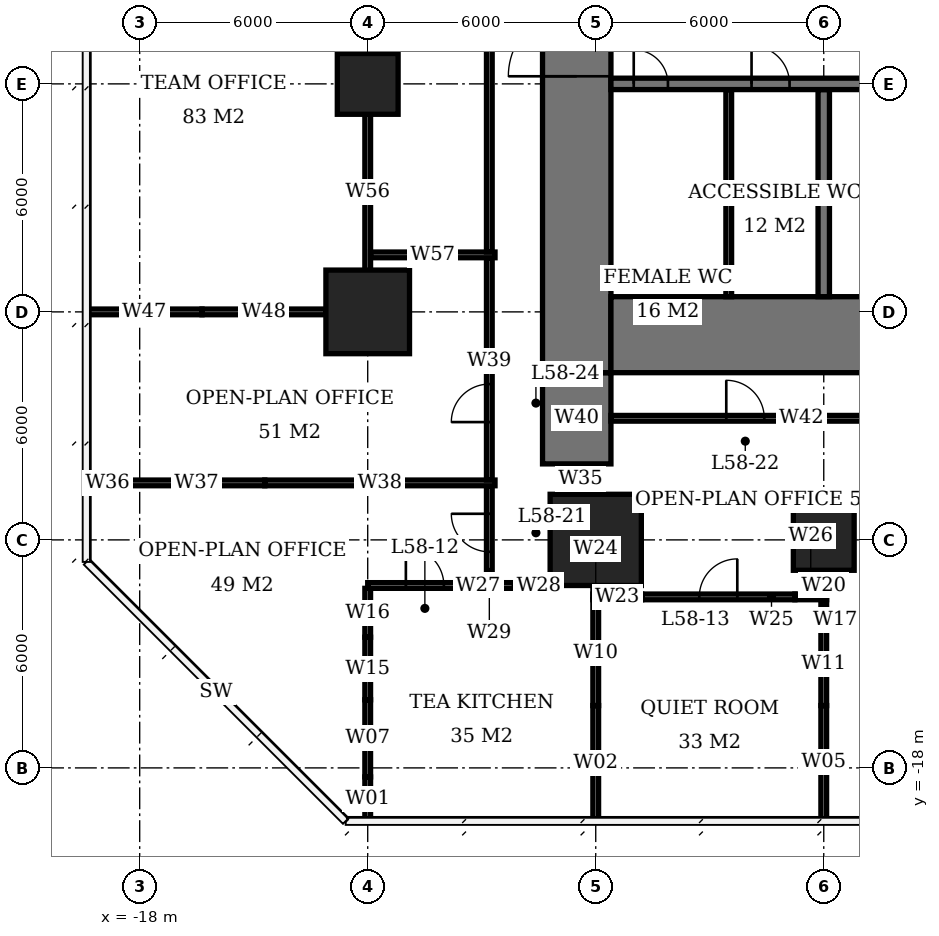
"""IFC4 building model, lengths in metres.
Left out: names, types, materials, properties, quantities, classifications, styles, units other than length and angle.
Written with IfcOpenShell. Run it as: python <this file> out.ifc"""

import sys

from ifc_helpers import new_model, si_unit, direction, frame, frame_2d, origin, origin_2d, place, context, subcontext, project, spatial, rectangle, extrude, element, fill, save


model = new_model("IFC4")
c1 = context("Model", 3, precision=1e-05, world=origin(), true_north=direction((0.0, 1.0)))
c2 = subcontext(c1, "Body", "Model", "MODEL_VIEW")
j1 = project(units=[si_unit("LENGTHUNIT", "METRE"), si_unit("PLANEANGLEUNIT", "RADIAN")], contexts=[c1])
p1 = place(None, origin())
s1 = spatial("IfcSite", under=j1, at=p1, CompositionType="ELEMENT")
p2 = place(p1, origin())
s2 = spatial("IfcBuilding", under=s1, at=p2, CompositionType="ELEMENT")
p3 = place(p2, frame((0.0, 0.0, 235.7)))
s3 = spatial("IfcBuildingStorey", under=s2, at=p3, CompositionType="ELEMENT", Elevation=235.7)
p4 = place(p3, frame((-12.0, -6.0, 0.0), z_axis=(0.0, 0.0, 1.0), x_axis=(1.0, 0.0, 0.0)))
e1 = element("IfcColumn", 1, at=p4, inside=s3, PredefinedType="COLUMN", context=c2, shape_type="SweptSolid", body=[
    extrude(rectangle(XDim=2.2, YDim=2.2, at=origin_2d()), origin(), (0.0, 0.0, 1.0), 3.9),
])
p5 = place(p3, frame((-12.0, 0.0, 0.0), z_axis=(0.0, 0.0, 1.0), x_axis=(1.0, 0.0, 0.0)))
e2 = element("IfcColumn", 2, at=p5, inside=s3, PredefinedType="COLUMN", context=c2, shape_type="SweptSolid", body=[
    extrude(rectangle(XDim=1.6, YDim=1.6, at=origin_2d()), origin(), (0.0, 0.0, 1.0), 3.9),
])
p6 = place(p3, frame((-6.0, -12.0, 0.0), z_axis=(0.0, 0.0, 1.0), x_axis=(1.0, 0.0, 0.0)))
e3 = element("IfcColumn", 3, at=p6, inside=s3, PredefinedType="COLUMN", context=c2, shape_type="SweptSolid", body=[
    extrude(rectangle(XDim=2.4, YDim=2.4, at=origin_2d()), origin(), (0.0, 0.0, 1.0), 3.9),
])
p7 = place(p3, frame((0.0, -12.0, 0.0), z_axis=(0.0, 0.0, 1.0), x_axis=(1.0, 0.0, 0.0)))
e4 = element("IfcColumn", 4, at=p7, inside=s3, PredefinedType="COLUMN", context=c2, shape_type="SweptSolid", body=[
    extrude(rectangle(XDim=1.6, YDim=1.6, at=origin_2d()), origin(), (0.0, 0.0, 1.0), 3.9),
])
p8 = place(p3, frame((-5.6, -6.6, 0.0), z_axis=(0.0, 0.0, 1.0), x_axis=(1.0, 0.0, 0.0)))
e5 = element("IfcWall", 5, at=p8, inside=s3, PredefinedType="SHEAR", context=c2, shape_type="SweptSolid", body=[
    extrude(rectangle(XDim=23.2, YDim=2.0, at=frame_2d((11.6, 0.0))), origin(), (0.0, 0.0, 1.0), 3.9),
])
p9 = place(p3, frame((-6.5, -7.6, 0.0), z_axis=(0.0, 0.0, 1.0), x_axis=(0.0, 1.0, 0.0)))
e6 = element("IfcWall", 6, at=p9, inside=s3, PredefinedType="SHEAR", context=c2, shape_type="SweptSolid", body=[
    extrude(rectangle(XDim=21.2, YDim=1.8, at=frame_2d((10.6, 0.0))), origin(), (0.0, 0.0, 1.0), 3.9),
])
p10 = place(p9, frame((7.8, 0.0, 0.0)))
e7 = element("IfcOpeningElement", 7, at=p10, cuts=e6, PredefinedType="OPENING", context=c2, shape_type="SweptSolid", body=[
    extrude(rectangle(XDim=1.8, YDim=2.4, at=frame_2d((0.9, 1.2))), frame((0.0, 0.91, 0.0), z_axis=(0.0, -1.0, 0.0), x_axis=(1.0, 0.0, 0.0)), (0.0, 0.0, 1.0), 1.82),
])
p11 = place(p3, frame((-6.5, -10.0, 0.0), z_axis=(0.0, 0.0, 1.0), x_axis=(0.0, 1.0, 0.0)))
e8 = element("IfcWall", 8, at=p11, inside=s3, PredefinedType="SHEAR", context=c2, shape_type="SweptSolid", body=[
    extrude(rectangle(XDim=2.4, YDim=1.8, at=frame_2d((1.2, 0.0))), origin(), (0.0, 0.0, 1.0), 3.9),
])
p12 = place(p3, frame((-5.6, 0.0, 0.0), z_axis=(0.0, 0.0, 1.0), x_axis=(1.0, 0.0, 0.0)))
e9 = element("IfcWall", 9, at=p12, inside=s3, PredefinedType="SHEAR", context=c2, shape_type="SweptSolid", body=[
    extrude(rectangle(XDim=17.75, YDim=0.3, at=frame_2d((8.875, 0.0))), origin(), (0.0, 0.0, 1.0), 3.9),
])
p13 = place(p12, frame((0.6, 0.0, 0.0)))
e10 = element("IfcOpeningElement", 10, at=p13, cuts=e9, PredefinedType="OPENING", context=c2, shape_type="SweptSolid", body=[
    extrude(rectangle(XDim=0.9, YDim=2.1, at=frame_2d((0.45, 1.05))), frame((0.0, 0.16, 0.0), z_axis=(0.0, -1.0, 0.0), x_axis=(1.0, 0.0, 0.0)), (0.0, 0.0, 1.0), 0.32),
])
p14 = place(p12, frame((3.7, 0.0, 0.0)))
e11 = element("IfcOpeningElement", 11, at=p14, cuts=e9, PredefinedType="OPENING", context=c2, shape_type="SweptSolid", body=[
    extrude(rectangle(XDim=1.0, YDim=2.1, at=frame_2d((0.5, 1.05))), frame((0.0, 0.16, 0.0), z_axis=(0.0, -1.0, 0.0), x_axis=(1.0, 0.0, 0.0)), (0.0, 0.0, 1.0), 0.32),
])
p15 = place(p12, frame((9.6, 0.0, 0.0)))
e12 = element("IfcOpeningElement", 12, at=p15, cuts=e9, PredefinedType="OPENING", context=c2, shape_type="SweptSolid", body=[
    extrude(rectangle(XDim=1.0, YDim=2.1, at=frame_2d((0.5, 1.05))), frame((0.0, 0.16, 0.0), z_axis=(0.0, -1.0, 0.0), x_axis=(1.0, 0.0, 0.0)), (0.0, 0.0, 1.0), 0.32),
])
p16 = place(p12, frame((12.55, 0.0, 0.0)))
e13 = element("IfcOpeningElement", 13, at=p16, cuts=e9, PredefinedType="OPENING", context=c2, shape_type="SweptSolid", body=[
    extrude(rectangle(XDim=1.1, YDim=2.1, at=frame_2d((0.55, 1.05))), frame((0.0, 0.16, 0.0), z_axis=(0.0, -1.0, 0.0), x_axis=(1.0, 0.0, 0.0)), (0.0, 0.0, 1.0), 0.32),
])
p17 = place(p12, frame((15.55, 0.0, 0.0)))
e14 = element("IfcOpeningElement", 14, at=p17, cuts=e9, PredefinedType="OPENING", context=c2, shape_type="SweptSolid", body=[
    extrude(rectangle(XDim=1.1, YDim=2.1, at=frame_2d((0.55, 1.05))), frame((0.0, 0.16, 0.0), z_axis=(0.0, -1.0, 0.0), x_axis=(1.0, 0.0, 0.0)), (0.0, 0.0, 1.0), 0.32),
])
p18 = place(p3, frame((0.0, -5.6, 0.0), z_axis=(0.0, 0.0, 1.0), x_axis=(0.0, 1.0, 0.0)))
e15 = element("IfcWall", 15, at=p18, inside=s3, PredefinedType="SHEAR", context=c2, shape_type="SweptSolid", body=[
    extrude(rectangle(XDim=5.45, YDim=0.3, at=frame_2d((2.725, 0.0))), origin(), (0.0, 0.0, 1.0), 3.9),
])
p19 = place(p3, frame((-2.5, -5.6, 0.0), z_axis=(0.0, 0.0, 1.0), x_axis=(0.0, 1.0, 0.0)))
e16 = element("IfcWall", 16, at=p19, inside=s3, PredefinedType="PLUMBINGWALL", context=c2, shape_type="SweptSolid", body=[
    extrude(rectangle(XDim=5.45, YDim=0.15, at=frame_2d((2.725, 0.0))), origin(), (0.0, 0.0, 1.0), 3.65),
])
p20 = place(p3, frame((-0.15, -14.1, 0.0), z_axis=(0.0, 0.0, 1.0), x_axis=(1.0, 0.0, 0.0)))
e17 = element("IfcWall", 17, at=p20, inside=s3, PredefinedType="PARTITIONING", context=c2, shape_type="SweptSolid", body=[
    extrude(rectangle(XDim=0.91, YDim=0.15, at=frame_2d((0.455, 0.0))), origin(), (0.0, 0.0, 1.0), 2.15),
])
p21 = place(p3, frame((0.76, -14.1, 0.0), z_axis=(0.0, 0.0, 1.0), x_axis=(1.0, 0.0, 0.0)))
e18 = element("IfcWall", 18, at=p21, inside=s3, PredefinedType="PARTITIONING", context=c2, shape_type="SweptSolid", body=[
    extrude(rectangle(XDim=4.48, YDim=0.15, at=frame_2d((2.24, 0.0))), origin(), (0.0, 0.0, 1.0), 3.65),
])
p22 = place(p21, frame((1.74, 0.0, 0.0)))
e19 = element("IfcOpeningElement", 19, at=p22, cuts=e18, PredefinedType="OPENING", context=c2, shape_type="SweptSolid", body=[
    extrude(rectangle(XDim=1.0, YDim=2.1, at=frame_2d((0.5, 1.05))), frame((0.0, 0.085, 0.0), z_axis=(0.0, -1.0, 0.0), x_axis=(1.0, 0.0, 0.0)), (0.0, 0.0, 1.0), 0.17),
])
p23 = place(p3, frame((-6.075, -13.5, 0.0), z_axis=(0.0, 0.0, 1.0), x_axis=(1.0, 0.0, 0.0)))
e20 = element("IfcWall", 20, at=p23, inside=s3, PredefinedType="PARTITIONING", context=c2, shape_type="SweptSolid", body=[
    extrude(rectangle(XDim=1.285, YDim=0.15, at=frame_2d((0.643, 0.0))), origin(), (0.0, 0.0, 1.0), 2.15),
])
p24 = place(p3, frame((-4.79, -13.5, 0.0), z_axis=(0.0, 0.0, 1.0), x_axis=(1.0, 0.0, 0.0)))
e21 = element("IfcWall", 21, at=p24, inside=s3, PredefinedType="PARTITIONING", context=c2, shape_type="SweptSolid", body=[
    extrude(rectangle(XDim=4.03, YDim=0.15, at=frame_2d((2.015, 0.0))), origin(), (0.0, 0.0, 1.0), 3.65),
])
p25 = place(p24, frame((1.515, 0.0, 0.0)))
e22 = element("IfcOpeningElement", 22, at=p25, cuts=e21, PredefinedType="OPENING", context=c2, shape_type="SweptSolid", body=[
    extrude(rectangle(XDim=1.0, YDim=2.1, at=frame_2d((0.5, 1.05))), frame((0.0, 0.085, 0.0), z_axis=(0.0, -1.0, 0.0), x_axis=(1.0, 0.0, 0.0)), (0.0, 0.0, 1.0), 0.17),
])
p26 = place(p3, frame((-0.76, -13.5, 0.0), z_axis=(0.0, 0.0, 1.0), x_axis=(1.0, 0.0, 0.0)))
e23 = element("IfcWall", 23, at=p26, inside=s3, PredefinedType="PARTITIONING", context=c2, shape_type="SweptSolid", body=[
    extrude(rectangle(XDim=0.835, YDim=0.15, at=frame_2d((0.417, 0.0))), origin(), (0.0, 0.0, 1.0), 2.15),
])
p27 = place(p3, frame((-12.0, -13.2, 0.0), z_axis=(0.0, 0.0, 1.0), x_axis=(1.0, 0.0, 0.0)))
e24 = element("IfcWall", 24, at=p27, inside=s3, PredefinedType="PARTITIONING", context=c2, shape_type="SweptSolid", body=[
    extrude(rectangle(XDim=3.008, YDim=0.15, at=frame_2d((1.504, 0.0))), origin(), (0.0, 0.0, 1.0), 3.65),
])
p28 = place(p27, frame((1.004, 0.0, 0.0)))
e25 = element("IfcOpeningElement", 25, at=p28, cuts=e24, PredefinedType="OPENING", context=c2, shape_type="SweptSolid", body=[
    extrude(rectangle(XDim=1.0, YDim=2.1, at=frame_2d((0.5, 1.05))), frame((0.0, 0.085, 0.0), z_axis=(0.0, -1.0, 0.0), x_axis=(1.0, 0.0, 0.0)), (0.0, 0.0, 1.0), 0.17),
])
p29 = place(p3, frame((-8.992, -13.2, 0.0), z_axis=(0.0, 0.0, 1.0), x_axis=(1.0, 0.0, 0.0)))
e26 = element("IfcWall", 26, at=p29, inside=s3, PredefinedType="PARTITIONING", context=c2, shape_type="SweptSolid", body=[
    extrude(rectangle(XDim=1.792, YDim=0.15, at=frame_2d((0.896, 0.0))), origin(), (0.0, 0.0, 1.0), 2.15),
])
p30 = place(p3, frame((-19.4, -6.0, 0.0), z_axis=(0.0, 0.0, 1.0), x_axis=(1.0, 0.0, 0.0)))
e27 = element("IfcWall", 27, at=p30, inside=s3, PredefinedType="PARTITIONING", context=c2, shape_type="SweptSolid", body=[
    extrude(rectangle(XDim=3.04, YDim=0.15, at=frame_2d((1.52, 0.0))), origin(), (0.0, 0.0, 1.0), 3.65),
])
p31 = place(p3, frame((-16.36, -6.0, 0.0), z_axis=(0.0, 0.0, 1.0), x_axis=(1.0, 0.0, 0.0)))
e28 = element("IfcWall", 28, at=p31, inside=s3, PredefinedType="PARTITIONING", context=c2, shape_type="SweptSolid", body=[
    extrude(rectangle(XDim=3.26, YDim=0.15, at=frame_2d((1.63, 0.0))), origin(), (0.0, 0.0, 1.0), 2.15),
])
p32 = place(p3, frame((-12.0, -19.4, 0.0), z_axis=(0.0, 0.0, 1.0), x_axis=(0.0, 1.0, 0.0)))
e29 = element("IfcWall", 29, at=p32, inside=s3, PredefinedType="PARTITIONING", context=c2, shape_type="SweptSolid", body=[
    extrude(rectangle(XDim=1.163, YDim=0.15, at=frame_2d((0.582, 0.0))), origin(), (0.0, 0.0, 1.0), 3.65),
])
p33 = place(p3, frame((-12.0, -18.237, 0.0), z_axis=(0.0, 0.0, 1.0), x_axis=(0.0, 1.0, 0.0)))
e30 = element("IfcWall", 30, at=p33, inside=s3, PredefinedType="PARTITIONING", context=c2, shape_type="SweptSolid", body=[
    extrude(rectangle(XDim=2.029, YDim=0.15, at=frame_2d((1.015, 0.0))), origin(), (0.0, 0.0, 1.0), 2.15),
])
p34 = place(p3, frame((-12.0, -16.208, 0.0), z_axis=(0.0, 0.0, 1.0), x_axis=(0.0, 1.0, 0.0)))
e31 = element("IfcWall", 31, at=p34, inside=s3, PredefinedType="PARTITIONING", context=c2, shape_type="SweptSolid", body=[
    extrude(rectangle(XDim=1.647, YDim=0.15, at=frame_2d((0.824, 0.0))), origin(), (0.0, 0.0, 1.0), 3.65),
])
p35 = place(p3, frame((-12.0, -14.561, 0.0), z_axis=(0.0, 0.0, 1.0), x_axis=(0.0, 1.0, 0.0)))
e32 = element("IfcWall", 32, at=p35, inside=s3, PredefinedType="PARTITIONING", context=c2, shape_type="SweptSolid", body=[
    extrude(rectangle(XDim=1.286, YDim=0.15, at=frame_2d((0.643, 0.0))), origin(), (0.0, 0.0, 1.0), 2.15),
])
p36 = place(p3, frame((-12.0, -4.915, 0.0), z_axis=(0.0, 0.0, 1.0), x_axis=(0.0, 1.0, 0.0)))
e33 = element("IfcWall", 33, at=p36, inside=s3, PredefinedType="PARTITIONING", context=c2, shape_type="SweptSolid", body=[
    extrude(rectangle(XDim=4.115, YDim=0.15, at=frame_2d((2.058, 0.0))), origin(), (0.0, 0.0, 1.0), 3.65),
])
p37 = place(p3, frame((-12.0, 0.8, 0.0), z_axis=(0.0, 0.0, 1.0), x_axis=(0.0, 1.0, 0.0)))
e34 = element("IfcWall", 34, at=p37, inside=s3, PredefinedType="PARTITIONING", context=c2, shape_type="SweptSolid", body=[
    extrude(rectangle(XDim=4.4, YDim=0.15, at=frame_2d((2.2, 0.0))), origin(), (0.0, 0.0, 1.0), 3.65),
])
p38 = place(p37, frame((1.7, 0.0, 0.0)))
e35 = element("IfcOpeningElement", 35, at=p38, cuts=e34, PredefinedType="OPENING", context=c2, shape_type="SweptSolid", body=[
    extrude(rectangle(XDim=1.0, YDim=2.1, at=frame_2d((0.5, 1.05))), frame((0.0, 0.085, 0.0), z_axis=(0.0, -1.0, 0.0), x_axis=(1.0, 0.0, 0.0)), (0.0, 0.0, 1.0), 0.17),
])
p39 = place(p3, frame((-6.0, -19.4, 0.0), z_axis=(0.0, 0.0, 1.0), x_axis=(0.0, 1.0, 0.0)))
e36 = element("IfcWall", 36, at=p39, inside=s3, PredefinedType="PARTITIONING", context=c2, shape_type="SweptSolid", body=[
    extrude(rectangle(XDim=3.04, YDim=0.15, at=frame_2d((1.52, 0.0))), origin(), (0.0, 0.0, 1.0), 3.65),
])
p40 = place(p3, frame((-6.0, -16.36, 0.0), z_axis=(0.0, 0.0, 1.0), x_axis=(0.0, 1.0, 0.0)))
e37 = element("IfcWall", 37, at=p40, inside=s3, PredefinedType="PARTITIONING", context=c2, shape_type="SweptSolid", body=[
    extrude(rectangle(XDim=2.785, YDim=0.15, at=frame_2d((1.393, 0.0))), origin(), (0.0, 0.0, 1.0), 2.15),
])
p41 = place(p3, frame((-6.0, -13.5, 0.0), z_axis=(0.0, 0.0, 1.0), x_axis=(0.0, 1.0, 0.0)))
e38 = element("IfcWall", 38, at=p41, inside=s3, PredefinedType="PARTITIONING", context=c2, shape_type="SweptSolid", body=[
    extrude(rectangle(XDim=0.3, YDim=0.15, at=frame_2d((0.15, 0.0))), origin(), (0.0, 0.0, 1.0), 2.15),
])
p42 = place(p3, frame((0.0, -19.35, 0.0), z_axis=(0.0, 0.0, 1.0), x_axis=(0.0, 1.0, 0.0)))
e39 = element("IfcWall", 39, at=p42, inside=s3, PredefinedType="PARTITIONING", context=c2, shape_type="SweptSolid", body=[
    extrude(rectangle(XDim=2.99, YDim=0.15, at=frame_2d((1.495, 0.0))), origin(), (0.0, 0.0, 1.0), 3.65),
])
p43 = place(p3, frame((0.0, -16.36, 0.0), z_axis=(0.0, 0.0, 1.0), x_axis=(0.0, 1.0, 0.0)))
e40 = element("IfcWall", 40, at=p43, inside=s3, PredefinedType="PARTITIONING", context=c2, shape_type="SweptSolid", body=[
    extrude(rectangle(XDim=2.185, YDim=0.15, at=frame_2d((1.093, 0.0))), origin(), (0.0, 0.0, 1.0), 2.15),
])
p44 = place(p3, frame((0.0, -14.025, 0.0), z_axis=(0.0, 0.0, 1.0), x_axis=(0.0, 1.0, 0.0)))
e41 = element("IfcWall", 41, at=p44, inside=s3, PredefinedType="PARTITIONING", context=c2, shape_type="SweptSolid", body=[
    extrude(rectangle(XDim=0.45, YDim=0.15, at=frame_2d((0.225, 0.0))), origin(), (0.0, 0.0, 1.0), 2.15),
])
p45 = place(p3, frame((-19.4, -10.5, 0.0), z_axis=(0.0, 0.0, 1.0), x_axis=(1.0, 0.0, 0.0)))
e42 = element("IfcWall", 42, at=p45, inside=s3, PredefinedType="PARTITIONING", context=c2, shape_type="SweptSolid", body=[
    extrude(rectangle(XDim=1.108, YDim=0.15, at=frame_2d((0.554, 0.0))), origin(), (0.0, 0.0, 1.0), 3.65),
])
p46 = place(p3, frame((-18.292, -10.5, 0.0), z_axis=(0.0, 0.0, 1.0), x_axis=(1.0, 0.0, 0.0)))
e43 = element("IfcWall", 43, at=p46, inside=s3, PredefinedType="PARTITIONING", context=c2, shape_type="SweptSolid", body=[
    extrude(rectangle(XDim=3.584, YDim=0.15, at=frame_2d((1.792, 0.0))), origin(), (0.0, 0.0, 1.0), 2.15),
])
p47 = place(p3, frame((-14.708, -10.5, 0.0), z_axis=(0.0, 0.0, 1.0), x_axis=(1.0, 0.0, 0.0)))
e44 = element("IfcWall", 44, at=p47, inside=s3, PredefinedType="PARTITIONING", context=c2, shape_type="SweptSolid", body=[
    extrude(rectangle(XDim=6.058, YDim=0.15, at=frame_2d((3.029, 0.0))), origin(), (0.0, 0.0, 1.0), 3.65),
])
p48 = place(p3, frame((-11.925, -4.5, 0.0), z_axis=(0.0, 0.0, 1.0), x_axis=(1.0, 0.0, 0.0)))
e45 = element("IfcWall", 45, at=p48, inside=s3, PredefinedType="PARTITIONING", context=c2, shape_type="SweptSolid", body=[
    extrude(rectangle(XDim=3.275, YDim=0.15, at=frame_2d((1.638, 0.0))), origin(), (0.0, 0.0, 1.0), 3.65),
])
p49 = place(p3, frame((-8.8, -13.133, 0.0), z_axis=(0.0, 0.0, 1.0), x_axis=(0.0, 1.0, 0.0)))
e46 = element("IfcWall", 46, at=p49, inside=s3, PredefinedType="PARTITIONING", context=c2, shape_type="SweptSolid", body=[
    extrude(rectangle(XDim=2.558, YDim=0.15, at=frame_2d((1.279, 0.0))), origin(), (0.0, 0.0, 1.0), 3.65),
])
p50 = place(p49, frame((0.82, 0.0, 0.0)))
e47 = element("IfcOpeningElement", 47, at=p50, cuts=e46, PredefinedType="OPENING", context=c2, shape_type="SweptSolid", body=[
    extrude(rectangle(XDim=1.0, YDim=2.1, at=frame_2d((0.5, 1.05))), frame((0.0, 0.085, 0.0), z_axis=(0.0, -1.0, 0.0), x_axis=(1.0, 0.0, 0.0)), (0.0, 0.0, 1.0), 0.17),
])
p51 = place(p3, frame((-8.8, -10.425, 0.0), z_axis=(0.0, 0.0, 1.0), x_axis=(0.0, 1.0, 0.0)))
e48 = element("IfcWall", 48, at=p51, inside=s3, PredefinedType="PARTITIONING", context=c2, shape_type="SweptSolid", body=[
    extrude(rectangle(XDim=5.85, YDim=0.15, at=frame_2d((2.925, 0.0))), origin(), (0.0, 0.0, 1.0), 3.65),
])
p52 = place(p51, frame((1.525, 0.0, 0.0)))
e49 = element("IfcOpeningElement", 49, at=p52, cuts=e48, PredefinedType="OPENING", context=c2, shape_type="SweptSolid", body=[
    extrude(rectangle(XDim=1.0, YDim=2.1, at=frame_2d((0.5, 1.05))), frame((0.0, 0.085, 0.0), z_axis=(0.0, -1.0, 0.0), x_axis=(1.0, 0.0, 0.0)), (0.0, 0.0, 1.0), 0.17),
])
p53 = place(p3, frame((-8.8, -4.425, 0.0), z_axis=(0.0, 0.0, 1.0), x_axis=(0.0, 1.0, 0.0)))
e50 = element("IfcWall", 50, at=p53, inside=s3, PredefinedType="PARTITIONING", context=c2, shape_type="SweptSolid", body=[
    extrude(rectangle(XDim=29.825, YDim=0.15, at=frame_2d((14.913, 0.0))), origin(), (0.0, 0.0, 1.0), 3.65),
])
p54 = place(p53, frame((9.855, 0.0, 0.0)))
e51 = element("IfcOpeningElement", 51, at=p54, cuts=e50, PredefinedType="OPENING", context=c2, shape_type="SweptSolid", body=[
    extrude(rectangle(XDim=1.0, YDim=2.1, at=frame_2d((0.5, 1.05))), frame((0.0, 0.085, 0.0), z_axis=(0.0, -1.0, 0.0), x_axis=(1.0, 0.0, 0.0)), (0.0, 0.0, 1.0), 0.17),
])
p55 = place(p3, frame((-6.4, -10.8, 0.0), z_axis=(0.0, 0.0, 1.0), x_axis=(0.0, 1.0, 0.0)))
e52 = element("IfcWall", 52, at=p55, inside=s3, PredefinedType="PARTITIONING", context=c2, shape_type="SweptSolid", body=[
    extrude(rectangle(XDim=0.8, YDim=0.15, at=frame_2d((0.4, 0.0))), origin(), (0.0, 0.0, 1.0), 3.65),
])
p56 = place(p3, frame((-5.6, -8.8, 0.0), z_axis=(0.0, 0.0, 1.0), x_axis=(1.0, 0.0, 0.0)))
e53 = element("IfcWall", 53, at=p56, inside=s3, PredefinedType="PARTITIONING", context=c2, shape_type="SweptSolid", body=[
    extrude(rectangle(XDim=10.025, YDim=0.15, at=frame_2d((5.013, 0.0))), origin(), (0.0, 0.0, 1.0), 3.65),
])
p57 = place(p56, frame((3.035, 0.0, 0.0)))
e54 = element("IfcOpeningElement", 54, at=p57, cuts=e53, PredefinedType="OPENING", context=c2, shape_type="SweptSolid", body=[
    extrude(rectangle(XDim=1.0, YDim=2.1, at=frame_2d((0.5, 1.05))), frame((0.0, 0.085, 0.0), z_axis=(0.0, -1.0, 0.0), x_axis=(1.0, 0.0, 0.0)), (0.0, 0.0, 1.0), 0.17),
])
p58 = place(p10, origin())
e55 = element("IfcDoor", 55, at=p58, inside=s3, OperationType="DOUBLE_DOOR_SINGLE_SWING", PredefinedType="DOOR", context=c2, shape_type="SweptSolid", body=[
    extrude(rectangle(XDim=1.8, YDim=2.4, at=frame_2d((0.9, 1.2))), frame((0.0, 0.025, 0.0), z_axis=(0.0, -1.0, 0.0), x_axis=(1.0, 0.0, 0.0)), (0.0, 0.0, 1.0), 0.05),
])
fill(e7, e55)
p59 = place(p13, origin())
e56 = element("IfcDoor", 56, at=p59, inside=s3, OperationType="SINGLE_SWING_LEFT", PredefinedType="DOOR", context=c2, shape_type="SweptSolid", body=[
    extrude(rectangle(XDim=0.9, YDim=2.1, at=frame_2d((0.45, 1.05))), frame((0.0, 0.025, 0.0), z_axis=(0.0, -1.0, 0.0), x_axis=(1.0, 0.0, 0.0)), (0.0, 0.0, 1.0), 0.05),
])
fill(e10, e56)
p60 = place(p14, origin())
e57 = element("IfcDoor", 57, at=p60, inside=s3, OperationType="SINGLE_SWING_LEFT", PredefinedType="DOOR", context=c2, shape_type="SweptSolid", body=[
    extrude(rectangle(XDim=1.0, YDim=2.1, at=frame_2d((0.5, 1.05))), frame((0.0, 0.025, 0.0), z_axis=(0.0, -1.0, 0.0), x_axis=(1.0, 0.0, 0.0)), (0.0, 0.0, 1.0), 0.05),
])
fill(e11, e57)
p61 = place(p28, origin())
e58 = element("IfcDoor", 58, at=p61, inside=s3, OperationType="SINGLE_SWING_LEFT", PredefinedType="DOOR", context=c2, shape_type="SweptSolid", body=[
    extrude(rectangle(XDim=1.0, YDim=2.1, at=frame_2d((0.5, 1.05))), frame((0.0, 0.025, 0.0), z_axis=(0.0, -1.0, 0.0), x_axis=(1.0, 0.0, 0.0)), (0.0, 0.0, 1.0), 0.05),
])
fill(e25, e58)
p62 = place(p25, origin())
e59 = element("IfcDoor", 59, at=p62, inside=s3, OperationType="SINGLE_SWING_RIGHT", PredefinedType="DOOR", context=c2, shape_type="SweptSolid", body=[
    extrude(rectangle(XDim=1.0, YDim=2.1, at=frame_2d((0.5, 1.05))), frame((0.0, 0.025, 0.0), z_axis=(0.0, -1.0, 0.0), x_axis=(1.0, 0.0, 0.0)), (0.0, 0.0, 1.0), 0.05),
])
fill(e22, e59)
p63 = place(p50, origin())
e60 = element("IfcDoor", 60, at=p63, inside=s3, OperationType="SINGLE_SWING_RIGHT", PredefinedType="DOOR", context=c2, shape_type="SweptSolid", body=[
    extrude(rectangle(XDim=1.0, YDim=2.1, at=frame_2d((0.5, 1.05))), frame((0.0, 0.025, 0.0), z_axis=(0.0, -1.0, 0.0), x_axis=(1.0, 0.0, 0.0)), (0.0, 0.0, 1.0), 0.05),
])
fill(e47, e60)
p64 = place(p57, origin())
e61 = element("IfcDoor", 61, at=p64, inside=s3, OperationType="SINGLE_SWING_LEFT", PredefinedType="DOOR", context=c2, shape_type="SweptSolid", body=[
    extrude(rectangle(XDim=1.0, YDim=2.1, at=frame_2d((0.5, 1.05))), frame((0.0, 0.025, 0.0), z_axis=(0.0, -1.0, 0.0), x_axis=(1.0, 0.0, 0.0)), (0.0, 0.0, 1.0), 0.05),
])
fill(e54, e61)
p65 = place(p52, origin())
e62 = element("IfcDoor", 62, at=p65, inside=s3, OperationType="SINGLE_SWING_LEFT", PredefinedType="DOOR", context=c2, shape_type="SweptSolid", body=[
    extrude(rectangle(XDim=1.0, YDim=2.1, at=frame_2d((0.5, 1.05))), frame((0.0, 0.025, 0.0), z_axis=(0.0, -1.0, 0.0), x_axis=(1.0, 0.0, 0.0)), (0.0, 0.0, 1.0), 0.05),
])
fill(e49, e62)
save(model, sys.argv[1])
